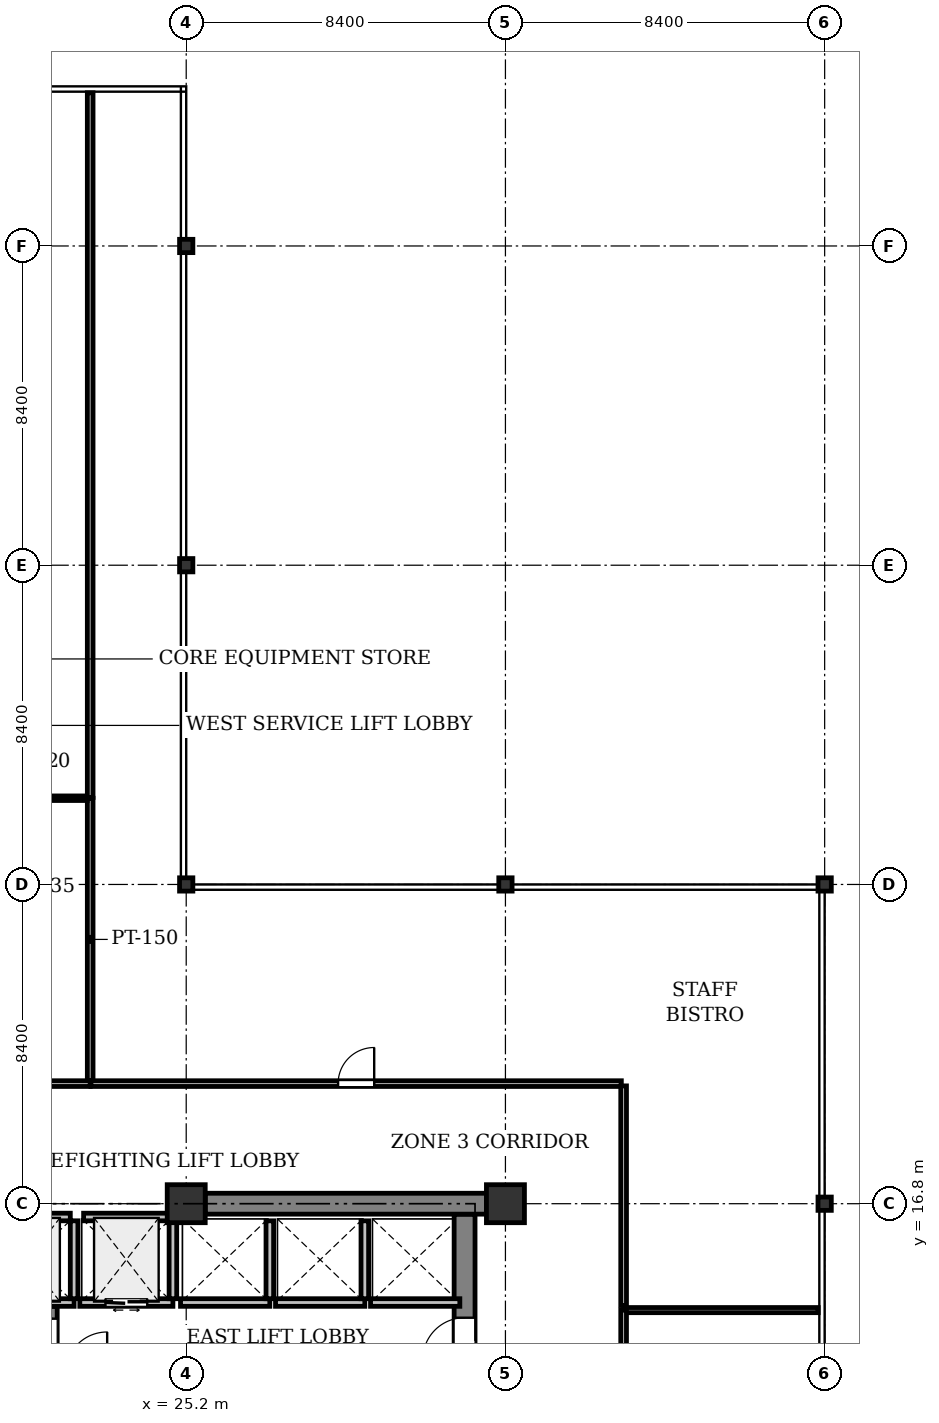
"""IFC4 building model, lengths in metres.
Left out: names, types, materials, properties, quantities, classifications, styles, units other than length and angle.
Written with IfcOpenShell. Run it as: python <this file> out.ifc"""

import sys

from ifc_helpers import new_model, si_unit, direction, frame, frame_2d, origin, origin_2d, place, context, subcontext, project, spatial, rectangle, i_section, extrude, element, fill, save


model = new_model("IFC4")
c1 = context("Model", 3, precision=1e-05, world=origin(), true_north=direction((0.0, 1.0)))
c2 = subcontext(c1, "Body", "Model", "MODEL_VIEW")
j1 = project(units=[si_unit("LENGTHUNIT", "METRE"), si_unit("PLANEANGLEUNIT", "RADIAN")], contexts=[c1])
p1 = place(None, origin())
s1 = spatial("IfcSite", under=j1, at=p1, CompositionType="ELEMENT")
p2 = place(p1, origin())
s2 = spatial("IfcBuilding", under=s1, at=p2, CompositionType="ELEMENT")
p3 = place(p2, frame((0.0, 0.0, 208.3)))
s3 = spatial("IfcBuildingStorey", under=s2, at=p3, CompositionType="ELEMENT", Elevation=208.3)
p4 = place(p3, frame((25.2, 16.8, 0.0), z_axis=(0.0, 0.0, 1.0), x_axis=(1.0, 0.0, 0.0)))
e1 = element("IfcColumn", 1, at=p4, inside=s3, PredefinedType="COLUMN", context=c2, shape_type="SweptSolid", body=[
    extrude(rectangle(XDim=1.0, YDim=1.0, at=origin_2d()), origin(), (0.0, 0.0, 1.0), 4.1),
])
for number, where, z_axis, x_axis in (
    (2, (25.2, 25.2, 0.0), (0.0, 0.0, 1.0), (1.0, 0.0, 0.0)),
    (3, (25.2, 33.6, 0.0), (0.0, 0.0, 1.0), (1.0, 0.0, 0.0)),
    (4, (25.2, 42.0, 0.0), (0.0, 0.0, 1.0), (1.0, 0.0, 0.0)),
):
    element("IfcColumn", number, at=place(p3, frame(where, z_axis=z_axis, x_axis=x_axis)), inside=s3, PredefinedType="COLUMN", context=c2, shape_type="SweptSolid", body=[
        extrude(i_section(OverallWidth=0.35, OverallDepth=0.35, WebThickness=0.02, FlangeThickness=0.032, at=origin_2d()), origin(), (0.0, 0.0, 1.0), 4.1),
    ])
p5 = place(p3, frame((33.6, 16.8, 0.0), z_axis=(0.0, 0.0, 1.0), x_axis=(1.0, 0.0, 0.0)))
e5 = element("IfcColumn", 5, at=p5, inside=s3, PredefinedType="COLUMN", context=c2, shape_type="SweptSolid", body=[
    extrude(rectangle(XDim=1.0, YDim=1.0, at=origin_2d()), origin(), (0.0, 0.0, 1.0), 4.1),
])
for number, where, z_axis, x_axis in (
    (6, (33.6, 25.2, 0.0), (0.0, 0.0, 1.0), (1.0, 0.0, 0.0)),
    (7, (42.0, 16.8, 0.0), (0.0, 0.0, 1.0), (1.0, 0.0, 0.0)),
    (8, (42.0, 25.2, 0.0), (0.0, 0.0, 1.0), (1.0, 0.0, 0.0)),
):
    element("IfcColumn", number, at=place(p3, frame(where, z_axis=z_axis, x_axis=x_axis)), inside=s3, PredefinedType="COLUMN", context=c2, shape_type="SweptSolid", body=[
        extrude(i_section(OverallWidth=0.35, OverallDepth=0.35, WebThickness=0.02, FlangeThickness=0.032, at=origin_2d()), origin(), (0.0, 0.0, 1.0), 4.1),
    ])
p6 = place(p3, frame((32.525, 8.675, 0.0), z_axis=(0.0, 0.0, 1.0), x_axis=(0.0, 1.0, 0.0)))
e9 = element("IfcWall", 9, at=p6, inside=s3, PredefinedType="SHEAR", context=c2, shape_type="SweptSolid", body=[
    extrude(rectangle(XDim=7.85, YDim=0.55, at=frame_2d((3.925, 0.0))), origin(), (0.0, 0.0, 1.0), 3.825),
])
p7 = place(p6, frame((4.025, 0.0, 0.0)))
e10 = element("IfcOpeningElement", 10, at=p7, cuts=e9, PredefinedType="OPENING", context=c2, shape_type="SweptSolid", body=[
    extrude(rectangle(XDim=1.1, YDim=2.15, at=frame_2d((0.55, 1.075))), frame((0.0, 0.285, 0.0), z_axis=(0.0, -1.0, 0.0), x_axis=(1.0, 0.0, 0.0)), (0.0, 0.0, 1.0), 0.57),
])
p8 = place(p3, frame((25.7, 16.8, 0.0), z_axis=(0.0, 0.0, 1.0), x_axis=(1.0, 0.0, 0.0)))
e11 = element("IfcWall", 11, at=p8, inside=s3, PredefinedType="SHEAR", context=c2, shape_type="SweptSolid", body=[
    extrude(rectangle(XDim=7.4, YDim=0.55, at=frame_2d((3.7, 0.0))), origin(), (0.0, 0.0, 1.0), 3.825),
])
p9 = place(p3, frame((21.68, 12.45, 0.0), z_axis=(0.0, 0.0, 1.0), x_axis=(0.0, 1.0, 0.0)))
e12 = element("IfcWall", 12, at=p9, inside=s3, PredefinedType="SHEAR", context=c2, shape_type="SweptSolid", body=[
    extrude(rectangle(XDim=1.65, YDim=0.25, at=frame_2d((0.825, 0.0))), origin(), (0.0, 0.0, 1.0), 3.825),
])
p10 = place(p9, frame((0.325, 0.0, 0.0)))
e13 = element("IfcOpeningElement", 13, at=p10, cuts=e12, PredefinedType="OPENING", context=c2, shape_type="SweptSolid", body=[
    extrude(rectangle(XDim=1.0, YDim=2.15, at=frame_2d((0.5, 1.075))), frame((0.0, 0.135, 0.0), z_axis=(0.0, -1.0, 0.0), x_axis=(1.0, 0.0, 0.0)), (0.0, 0.0, 1.0), 0.27),
])
p11 = place(p3, frame((19.8, 14.2, 0.0), z_axis=(0.0, 0.0, 1.0), x_axis=(1.0, 0.0, 0.0)))
e14 = element("IfcWall", 14, at=p11, inside=s3, PredefinedType="PARTITIONING", context=c2, shape_type="SweptSolid", body=[
    extrude(rectangle(XDim=2.45, YDim=0.2, at=frame_2d((1.225, 0.0))), origin(), (0.0, 0.0, 1.0), 3.825),
])
p12 = place(p11, frame((0.675, 0.0, 0.0)))
e15 = element("IfcOpeningElement", 15, at=p12, cuts=e14, PredefinedType="OPENING", context=c2, shape_type="SweptSolid", body=[
    extrude(rectangle(XDim=1.1, YDim=2.2, at=frame_2d((0.55, 1.1))), frame((0.0, 0.11, 0.0), z_axis=(0.0, -1.0, 0.0), x_axis=(1.0, 0.0, 0.0)), (0.0, 0.0, 1.0), 0.22),
])
p13 = place(p3, frame((22.25, 14.3, 0.0), z_axis=(0.0, 0.0, 1.0), x_axis=(0.0, 1.0, 0.0)))
e16 = element("IfcWall", 16, at=p13, inside=s3, PredefinedType="PARTITIONING", context=c2, shape_type="SweptSolid", body=[
    extrude(rectangle(XDim=2.05, YDim=0.2, at=frame_2d((1.025, 0.0))), origin(), (0.0, 0.0, 1.0), 3.825),
])
p14 = place(p3, frame((19.9, 16.45, 0.0), z_axis=(0.0, 0.0, 1.0), x_axis=(1.0, 0.0, 0.0)))
e17 = element("IfcWall", 17, at=p14, inside=s3, PredefinedType="PARTITIONING", context=c2, shape_type="SweptSolid", body=[
    extrude(rectangle(XDim=2.25, YDim=0.2, at=frame_2d((1.125, 0.0))), origin(), (0.0, 0.0, 1.0), 3.825),
])
p15 = place(p3, frame((22.4, 14.2, 0.0), z_axis=(0.0, 0.0, 1.0), x_axis=(1.0, 0.0, 0.0)))
e18 = element("IfcWall", 18, at=p15, inside=s3, PredefinedType="PARTITIONING", context=c2, shape_type="SweptSolid", body=[
    extrude(rectangle(XDim=2.45, YDim=0.2, at=frame_2d((1.225, 0.0))), origin(), (0.0, 0.0, 1.0), 3.825),
])
p16 = place(p15, frame((0.675, 0.0, 0.0)))
e19 = element("IfcOpeningElement", 19, at=p16, cuts=e18, PredefinedType="OPENING", context=c2, shape_type="SweptSolid", body=[
    extrude(rectangle(XDim=1.1, YDim=2.2, at=frame_2d((0.55, 1.1))), frame((0.0, 0.11, 0.0), z_axis=(0.0, -1.0, 0.0), x_axis=(1.0, 0.0, 0.0)), (0.0, 0.0, 1.0), 0.22),
])
p17 = place(p3, frame((24.85, 14.3, 0.0), z_axis=(0.0, 0.0, 1.0), x_axis=(0.0, 1.0, 0.0)))
e20 = element("IfcWall", 20, at=p17, inside=s3, PredefinedType="PARTITIONING", context=c2, shape_type="SweptSolid", body=[
    extrude(rectangle(XDim=2.05, YDim=0.2, at=frame_2d((1.025, 0.0))), origin(), (0.0, 0.0, 1.0), 3.825),
])
p18 = place(p3, frame((22.5, 16.45, 0.0), z_axis=(0.0, 0.0, 1.0), x_axis=(1.0, 0.0, 0.0)))
e21 = element("IfcWall", 21, at=p18, inside=s3, PredefinedType="PARTITIONING", context=c2, shape_type="SweptSolid", body=[
    extrude(rectangle(XDim=2.25, YDim=0.2, at=frame_2d((1.125, 0.0))), origin(), (0.0, 0.0, 1.0), 3.825),
])
p19 = place(p3, frame((25.05, 14.2, 0.0), z_axis=(0.0, 0.0, 1.0), x_axis=(1.0, 0.0, 0.0)))
e22 = element("IfcWall", 22, at=p19, inside=s3, PredefinedType="PARTITIONING", context=c2, shape_type="SweptSolid", body=[
    extrude(rectangle(XDim=2.35, YDim=0.2, at=frame_2d((1.175, 0.0))), origin(), (0.0, 0.0, 1.0), 3.825),
])
p20 = place(p3, frame((27.4, 14.3, 0.0), z_axis=(0.0, 0.0, 1.0), x_axis=(0.0, 1.0, 0.0)))
e23 = element("IfcWall", 23, at=p20, inside=s3, PredefinedType="PARTITIONING", context=c2, shape_type="SweptSolid", body=[
    extrude(rectangle(XDim=2.05, YDim=0.2, at=frame_2d((1.025, 0.0))), origin(), (0.0, 0.0, 1.0), 3.825),
])
p21 = place(p3, frame((27.55, 14.2, 0.0), z_axis=(0.0, 0.0, 1.0), x_axis=(1.0, 0.0, 0.0)))
e24 = element("IfcWall", 24, at=p21, inside=s3, PredefinedType="PARTITIONING", context=c2, shape_type="SweptSolid", body=[
    extrude(rectangle(XDim=2.35, YDim=0.2, at=frame_2d((1.175, 0.0))), origin(), (0.0, 0.0, 1.0), 3.825),
])
p22 = place(p3, frame((29.9, 14.3, 0.0), z_axis=(0.0, 0.0, 1.0), x_axis=(0.0, 1.0, 0.0)))
e25 = element("IfcWall", 25, at=p22, inside=s3, PredefinedType="PARTITIONING", context=c2, shape_type="SweptSolid", body=[
    extrude(rectangle(XDim=2.05, YDim=0.2, at=frame_2d((1.025, 0.0))), origin(), (0.0, 0.0, 1.0), 3.825),
])
p23 = place(p3, frame((30.05, 14.2, 0.0), z_axis=(0.0, 0.0, 1.0), x_axis=(1.0, 0.0, 0.0)))
e26 = element("IfcWall", 26, at=p23, inside=s3, PredefinedType="PARTITIONING", context=c2, shape_type="SweptSolid", body=[
    extrude(rectangle(XDim=2.35, YDim=0.2, at=frame_2d((1.175, 0.0))), origin(), (0.0, 0.0, 1.0), 3.825),
])
p24 = place(p3, frame((7.71, 19.96, 0.0), z_axis=(0.0, 0.0, 1.0), x_axis=(1.0, 0.0, 0.0)))
e27 = element("IfcWall", 27, at=p24, inside=s3, PredefinedType="PARTITIONING", context=c2, shape_type="SweptSolid", body=[
    extrude(rectangle(XDim=14.963, YDim=0.15, at=frame_2d((7.481, 0.0))), origin(), (0.0, 0.0, 1.0), 3.371),
])
p25 = place(p24, frame((7.007, 0.0, 0.0)))
e28 = element("IfcOpeningElement", 28, at=p25, cuts=e27, PredefinedType="OPENING", context=c2, shape_type="SweptSolid", body=[
    extrude(rectangle(XDim=0.95, YDim=2.15, at=frame_2d((0.475, 1.075))), frame((0.0, 0.085, 0.0), z_axis=(0.0, -1.0, 0.0), x_axis=(1.0, 0.0, 0.0)), (0.0, 0.0, 1.0), 0.17),
])
p26 = place(p3, frame((22.673, 20.039, 0.0), z_axis=(0.0, 0.0, 1.0), x_axis=(0.0, 1.0, 0.0)))
e29 = element("IfcWall", 29, at=p26, inside=s3, PredefinedType="PARTITIONING", context=c2, shape_type="SweptSolid", body=[
    extrude(rectangle(XDim=7.43, YDim=0.15, at=frame_2d((3.715, 0.0))), origin(), (0.0, 0.0, 1.0), 3.365),
])
p27 = place(p3, frame((22.594, 27.469, 0.0), z_axis=(0.0, 0.0, 1.0), x_axis=(-1.0, 0.0, 0.0)))
e30 = element("IfcWall", 30, at=p27, inside=s3, PredefinedType="PARTITIONING", context=c2, shape_type="SweptSolid", body=[
    extrude(rectangle(XDim=2.634, YDim=0.12, at=frame_2d((1.317, 0.0))), origin(), (0.0, 0.0, 1.0), 3.518),
])
p28 = place(p3, frame((41.831, 14.0, 0.0), z_axis=(0.0, 0.0, 1.0), x_axis=(-1.0, 0.0, 0.0)))
e31 = element("IfcWall", 31, at=p28, inside=s3, PredefinedType="PARTITIONING", context=c2, shape_type="SweptSolid", body=[
    extrude(rectangle(XDim=5.121, YDim=0.135, at=frame_2d((2.561, 0.0))), origin(), (0.0, 0.0, 1.0), 3.518),
])
p29 = place(p3, frame((36.71, 14.0, 0.0), z_axis=(0.0, 0.0, 1.0), x_axis=(-2.836799e-05, -0.999999999598, 0.0)))
e32 = element("IfcWall", 32, at=p29, inside=s3, PredefinedType="PARTITIONING", context=c2, shape_type="SweptSolid", body=[
    extrude(rectangle(XDim=8.606, YDim=0.15, at=frame_2d((4.303, 0.0))), origin(), (0.0, 0.0, 1.0), 3.365),
])
p30 = place(p29, frame((3.828, 0.0, 0.0)))
e33 = element("IfcOpeningElement", 33, at=p30, cuts=e32, PredefinedType="OPENING", context=c2, shape_type="SweptSolid", body=[
    extrude(rectangle(XDim=0.95, YDim=2.15, at=frame_2d((0.475, 1.075))), frame((0.0, 0.085, 0.0), z_axis=(0.0, -1.0, 0.0), x_axis=(1.0, 0.0, 0.0)), (0.0, 0.0, 1.0), 0.17),
])
p31 = place(p3, frame((22.673, 46.031, 0.0), z_axis=(0.0, 0.0, 1.0), x_axis=(0.0, -1.0, 0.0)))
e34 = element("IfcWall", 34, at=p31, inside=s3, PredefinedType="PARTITIONING", context=c2, shape_type="SweptSolid", body=[
    extrude(rectangle(XDim=18.542, YDim=0.15, at=frame_2d((9.271, 0.0))), origin(), (0.0, 0.0, 1.0), 3.365),
])
p32 = place(p3, frame((22.693, 19.96, 0.0), z_axis=(0.0, 0.0, 1.0), x_axis=(1.0, 0.0, 0.0)))
e35 = element("IfcWall", 35, at=p32, inside=s3, PredefinedType="PARTITIONING", context=c2, shape_type="SweptSolid", body=[
    extrude(rectangle(XDim=13.957, YDim=0.15, at=frame_2d((6.979, 0.0))), origin(), (0.0, 0.0, 1.0), 3.371),
])
p33 = place(p32, frame((6.503, 0.0, 0.0)))
e36 = element("IfcOpeningElement", 36, at=p33, cuts=e35, PredefinedType="OPENING", context=c2, shape_type="SweptSolid", body=[
    extrude(rectangle(XDim=0.95, YDim=2.15, at=frame_2d((0.475, 1.075))), frame((0.0, 0.085, 0.0), z_axis=(0.0, -1.0, 0.0), x_axis=(1.0, 0.0, 0.0)), (0.0, 0.0, 1.0), 0.17),
])
p34 = place(p3, frame((36.71, 19.9, 0.0), z_axis=(0.0, 0.0, 1.0), x_axis=(0.0, -1.0, 0.0)))
e37 = element("IfcWall", 37, at=p34, inside=s3, PredefinedType="PARTITIONING", context=c2, shape_type="SweptSolid", body=[
    extrude(rectangle(XDim=5.78, YDim=0.15, at=frame_2d((2.89, 0.0))), origin(), (0.0, 0.0, 1.0), 3.365),
])
p35 = place(p7, origin())
e38 = element("IfcDoor", 38, at=p35, inside=s3, OperationType="SINGLE_SWING_LEFT", PredefinedType="DOOR", context=c2, shape_type="SweptSolid", body=[
    extrude(rectangle(XDim=1.1, YDim=2.15, at=frame_2d((0.55, 1.075))), frame((0.0, 0.025, 0.0), z_axis=(0.0, -1.0, 0.0), x_axis=(1.0, 0.0, 0.0)), (0.0, 0.0, 1.0), 0.05),
])
fill(e10, e38)
p36 = place(p10, origin())
e39 = element("IfcDoor", 39, at=p36, inside=s3, OperationType="SINGLE_SWING_RIGHT", PredefinedType="DOOR", context=c2, shape_type="SweptSolid", body=[
    extrude(rectangle(XDim=1.0, YDim=2.15, at=frame_2d((0.5, 1.075))), frame((0.0, 0.025, 0.0), z_axis=(0.0, -1.0, 0.0), x_axis=(1.0, 0.0, 0.0)), (0.0, 0.0, 1.0), 0.05),
])
fill(e13, e39)
p37 = place(p16, origin())
e40 = element("IfcDoor", 40, at=p37, inside=s3, OperationType="DOUBLE_DOOR_SLIDING", PredefinedType="DOOR", context=c2, shape_type="SweptSolid", body=[
    extrude(rectangle(XDim=1.1, YDim=2.2, at=frame_2d((0.55, 1.1))), frame((0.0, 0.025, 0.0), z_axis=(0.0, -1.0, 0.0), x_axis=(1.0, 0.0, 0.0)), (0.0, 0.0, 1.0), 0.05),
])
fill(e19, e40)
p38 = place(p33, origin())
e41 = element("IfcDoor", 41, at=p38, inside=s3, OperationType="SINGLE_SWING_RIGHT", PredefinedType="DOOR", context=c2, shape_type="SweptSolid", body=[
    extrude(rectangle(XDim=0.95, YDim=2.15, at=frame_2d((0.475, 1.075))), frame((0.0, 0.025, 0.0), z_axis=(0.0, -1.0, 0.0), x_axis=(1.0, 0.0, 0.0)), (0.0, 0.0, 1.0), 0.05),
])
fill(e36, e41)
save(model, sys.argv[1])
